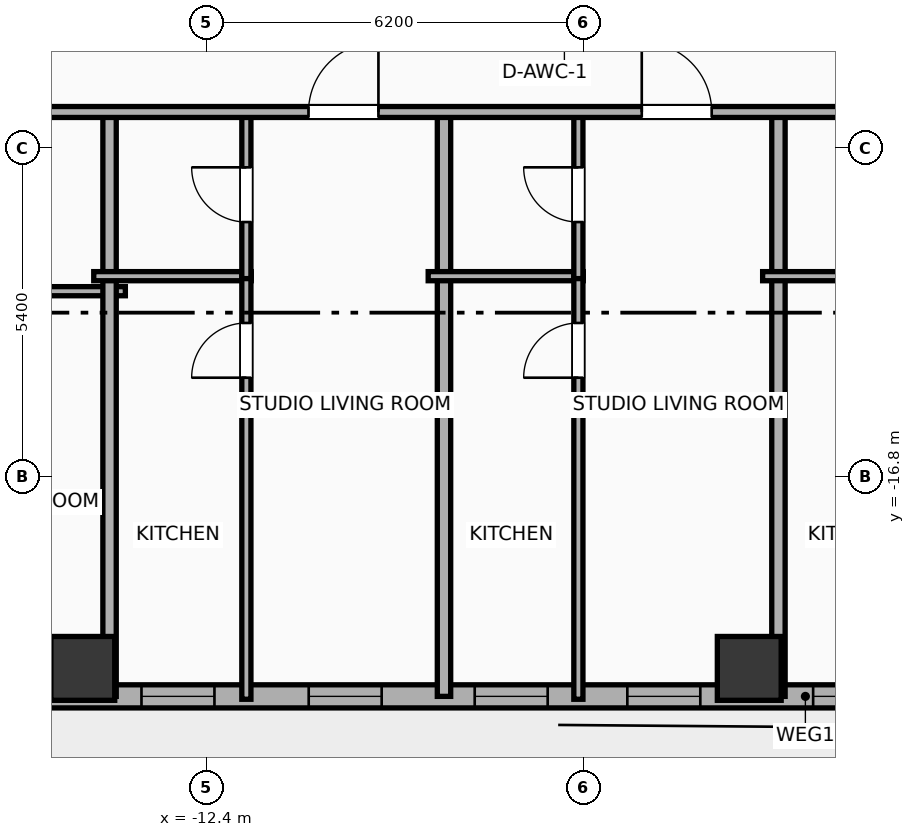
"""IFC4 building model, lengths in metres.
Left out: names, types, materials, properties, quantities, classifications, styles, units other than length and angle.
Written with IfcOpenShell. Run it as: python <this file> out.ifc"""

import sys

from ifc_helpers import new_model, si_unit, direction, frame, frame_2d, origin, origin_2d, place, context, subcontext, project, spatial, rectangle, hollow_rectangle, extrude, element, fill, save


model = new_model("IFC4")
c1 = context("Model", 3, precision=1e-05, world=origin(), true_north=direction((0.0, 1.0)))
c2 = subcontext(c1, "Body", "Model", "MODEL_VIEW")
j1 = project(units=[si_unit("LENGTHUNIT", "METRE"), si_unit("PLANEANGLEUNIT", "RADIAN")], contexts=[c1])
p1 = place(None, origin())
s1 = spatial("IfcSite", under=j1, at=p1, CompositionType="ELEMENT")
p2 = place(p1, origin())
s2 = spatial("IfcBuilding", under=s1, at=p2, CompositionType="ELEMENT")
p3 = place(p2, frame((0.0, 0.0, 85.8)))
s3 = spatial("IfcBuildingStorey", under=s2, at=p3, CompositionType="ELEMENT", Elevation=85.8)
for number, where, z_axis, x_axis in (
    (1, (-14.44, -19.95, -0.4), (0.0, 0.0, 1.0), (1.0, 0.0, 0.0)),
    (2, (-3.48, -19.95, -0.4), (0.0, 0.0, 1.0), (1.0, 0.0, 0.0)),
):
    element("IfcColumn", number, at=place(p3, frame(where, z_axis=z_axis, x_axis=x_axis)), inside=s3, PredefinedType="COLUMN", context=c2, shape_type="SweptSolid", body=[
        extrude(hollow_rectangle(XDim=1.05, YDim=1.05, WallThickness=0.036, at=origin_2d()), origin(), (0.0, 0.0, 1.0), 4.3),
    ])
p4 = place(p3, frame((29.381, -20.41, 0.0), z_axis=(0.0, 0.0, 1.0), x_axis=(-1.0, 0.0, 0.0)))
e3 = element("IfcWall", 3, at=p4, inside=s3, PredefinedType="ELEMENTEDWALL", context=c2, shape_type="SweptSolid", body=[
    extrude(rectangle(XDim=54.763, YDim=0.38, at=frame_2d((27.381, 0.0))), origin(), (0.0, 0.0, 1.0), 2.54),
])
p5 = place(p4, frame((18.486, 0.0, 0.75)))
e4 = element("IfcOpeningElement", 4, at=p5, cuts=e3, PredefinedType="OPENING", context=c2, shape_type="SweptSolid", body=[
    extrude(rectangle(XDim=2.4, YDim=1.45, at=frame_2d((1.2, 0.725))), frame((0.0, 0.2, 0.0), z_axis=(0.0, -1.0, 0.0), x_axis=(1.0, 0.0, 0.0)), (0.0, 0.0, 1.0), 0.4),
])
p6 = place(p4, frame((47.567, 0.0, 0.75)))
e5 = element("IfcOpeningElement", 5, at=p6, cuts=e3, PredefinedType="OPENING", context=c2, shape_type="SweptSolid", body=[
    extrude(rectangle(XDim=2.4, YDim=1.45, at=frame_2d((1.2, 0.725))), frame((0.0, 0.2, 0.0), z_axis=(0.0, -1.0, 0.0), x_axis=(1.0, 0.0, 0.0)), (0.0, 0.0, 1.0), 0.4),
])
p7 = place(p4, frame((7.464, 0.0, 0.0)))
e6 = element("IfcOpeningElement", 6, at=p7, cuts=e3, PredefinedType="OPENING", context=c2, shape_type="SweptSolid", body=[
    extrude(rectangle(XDim=1.5, YDim=2.05, at=frame_2d((0.75, 1.025))), frame((0.0, 0.2, 0.0), z_axis=(0.0, -1.0, 0.0), x_axis=(1.0, 0.0, 0.0)), (0.0, 0.0, 1.0), 0.4),
])
p8 = place(p4, frame((51.831, 0.0, 0.55)))
e7 = element("IfcOpeningElement", 7, at=p8, cuts=e3, PredefinedType="OPENING", context=c2, shape_type="SweptSolid", body=[
    extrude(rectangle(XDim=1.2, YDim=1.15, at=frame_2d((0.6, 0.575))), frame((0.0, 0.2, 0.0), z_axis=(0.0, -1.0, 0.0), x_axis=(1.0, 0.0, 0.0)), (0.0, 0.0, 1.0), 0.4),
])
p9 = place(p4, frame((44.606, 0.0, 0.55)))
e8 = element("IfcOpeningElement", 8, at=p9, cuts=e3, PredefinedType="OPENING", context=c2, shape_type="SweptSolid", body=[
    extrude(rectangle(XDim=1.2, YDim=1.15, at=frame_2d((0.6, 0.575))), frame((0.0, 0.2, 0.0), z_axis=(0.0, -1.0, 0.0), x_axis=(1.0, 0.0, 0.0)), (0.0, 0.0, 1.0), 0.4),
])
p10 = place(p4, frame((38.906, 0.0, 0.55)))
e9 = element("IfcOpeningElement", 9, at=p10, cuts=e3, PredefinedType="OPENING", context=c2, shape_type="SweptSolid", body=[
    extrude(rectangle(XDim=1.2, YDim=1.15, at=frame_2d((0.6, 0.575))), frame((0.0, 0.2, 0.0), z_axis=(0.0, -1.0, 0.0), x_axis=(1.0, 0.0, 0.0)), (0.0, 0.0, 1.0), 0.4),
])
p11 = place(p4, frame((41.656, 0.0, 0.55)))
e10 = element("IfcOpeningElement", 10, at=p11, cuts=e3, PredefinedType="OPENING", context=c2, shape_type="SweptSolid", body=[
    extrude(rectangle(XDim=1.2, YDim=1.15, at=frame_2d((0.6, 0.575))), frame((0.0, 0.2, 0.0), z_axis=(0.0, -1.0, 0.0), x_axis=(1.0, 0.0, 0.0)), (0.0, 0.0, 1.0), 0.4),
])
p12 = place(p4, frame((33.666, 0.0, 0.55)))
e11 = element("IfcOpeningElement", 11, at=p12, cuts=e3, PredefinedType="OPENING", context=c2, shape_type="SweptSolid", body=[
    extrude(rectangle(XDim=1.2, YDim=1.15, at=frame_2d((0.6, 0.575))), frame((0.0, 0.2, 0.0), z_axis=(0.0, -1.0, 0.0), x_axis=(1.0, 0.0, 0.0)), (0.0, 0.0, 1.0), 0.4),
])
p13 = place(p4, frame((36.176, 0.0, 0.55)))
e12 = element("IfcOpeningElement", 12, at=p13, cuts=e3, PredefinedType="OPENING", context=c2, shape_type="SweptSolid", body=[
    extrude(rectangle(XDim=1.2, YDim=1.15, at=frame_2d((0.6, 0.575))), frame((0.0, 0.2, 0.0), z_axis=(0.0, -1.0, 0.0), x_axis=(1.0, 0.0, 0.0)), (0.0, 0.0, 1.0), 0.4),
])
p14 = place(p4, frame((27.861, 0.0, 0.55)))
e13 = element("IfcOpeningElement", 13, at=p14, cuts=e3, PredefinedType="OPENING", context=c2, shape_type="SweptSolid", body=[
    extrude(rectangle(XDim=1.2, YDim=1.15, at=frame_2d((0.6, 0.575))), frame((0.0, 0.2, 0.0), z_axis=(0.0, -1.0, 0.0), x_axis=(1.0, 0.0, 0.0)), (0.0, 0.0, 1.0), 0.4),
])
p15 = place(p4, frame((30.611, 0.0, 0.55)))
e14 = element("IfcOpeningElement", 14, at=p15, cuts=e3, PredefinedType="OPENING", context=c2, shape_type="SweptSolid", body=[
    extrude(rectangle(XDim=1.2, YDim=1.15, at=frame_2d((0.6, 0.575))), frame((0.0, 0.2, 0.0), z_axis=(0.0, -1.0, 0.0), x_axis=(1.0, 0.0, 0.0)), (0.0, 0.0, 1.0), 0.4),
])
p16 = place(p4, frame((23.531, 0.0, 0.55)))
e15 = element("IfcOpeningElement", 15, at=p16, cuts=e3, PredefinedType="OPENING", context=c2, shape_type="SweptSolid", body=[
    extrude(rectangle(XDim=1.2, YDim=1.15, at=frame_2d((0.6, 0.575))), frame((0.0, 0.2, 0.0), z_axis=(0.0, -1.0, 0.0), x_axis=(1.0, 0.0, 0.0)), (0.0, 0.0, 1.0), 0.4),
])
p17 = place(p4, frame((16.386, 0.0, 0.55)))
e16 = element("IfcOpeningElement", 16, at=p17, cuts=e3, PredefinedType="OPENING", context=c2, shape_type="SweptSolid", body=[
    extrude(rectangle(XDim=1.2, YDim=1.15, at=frame_2d((0.6, 0.575))), frame((0.0, 0.2, 0.0), z_axis=(0.0, -1.0, 0.0), x_axis=(1.0, 0.0, 0.0)), (0.0, 0.0, 1.0), 0.4),
])
p18 = place(p4, frame((12.531, 0.0, 0.55)))
e17 = element("IfcOpeningElement", 17, at=p18, cuts=e3, PredefinedType="OPENING", context=c2, shape_type="SweptSolid", body=[
    extrude(rectangle(XDim=1.2, YDim=1.15, at=frame_2d((0.6, 0.575))), frame((0.0, 0.2, 0.0), z_axis=(0.0, -1.0, 0.0), x_axis=(1.0, 0.0, 0.0)), (0.0, 0.0, 1.0), 0.4),
])
p19 = place(p4, frame((4.377, 0.0, 0.55)))
e18 = element("IfcOpeningElement", 18, at=p19, cuts=e3, PredefinedType="OPENING", context=c2, shape_type="SweptSolid", body=[
    extrude(rectangle(XDim=1.2, YDim=1.15, at=frame_2d((0.6, 0.575))), frame((0.0, 0.2, 0.0), z_axis=(0.0, -1.0, 0.0), x_axis=(1.0, 0.0, 0.0)), (0.0, 0.0, 1.0), 0.4),
])
p20 = place(p4, frame((1.481, 0.0, 0.55)))
e19 = element("IfcOpeningElement", 19, at=p20, cuts=e3, PredefinedType="OPENING", context=c2, shape_type="SweptSolid", body=[
    extrude(rectangle(XDim=1.2, YDim=1.15, at=frame_2d((0.6, 0.575))), frame((0.0, 0.2, 0.0), z_axis=(0.0, -1.0, 0.0), x_axis=(1.0, 0.0, 0.0)), (0.0, 0.0, 1.0), 0.4),
])
p21 = place(p3, frame((-17.53, -13.747, 0.0), z_axis=(0.0, 0.0, 1.0), x_axis=(1.0, 0.0, 0.0)))
e20 = element("IfcWall", 20, at=p21, inside=s3, PredefinedType="PLUMBINGWALL", context=c2, shape_type="SweptSolid", body=[
    extrude(rectangle(XDim=3.79, YDim=0.15, at=frame_2d((1.895, 0.0))), origin(), (0.0, 0.0, 1.0), 3.65),
])
p22 = place(p3, frame((-14.0, -20.41, 0.0), z_axis=(0.0, 0.0, 1.0), x_axis=(0.0, 1.0, 0.0)))
e21 = element("IfcWall", 21, at=p22, inside=s3, PredefinedType="PARTITIONING", context=c2, shape_type="SweptSolid", body=[
    extrude(rectangle(XDim=9.69, YDim=0.22, at=frame_2d((4.845, 0.0))), origin(), (0.0, 0.0, 1.0), 2.54),
])
p23 = place(p3, frame((-14.26, -13.5, 0.0), z_axis=(0.0, 0.0, 1.0), x_axis=(1.0, 0.0, 0.0)))
e22 = element("IfcWall", 22, at=p23, inside=s3, PredefinedType="PLUMBINGWALL", context=c2, shape_type="SweptSolid", body=[
    extrude(rectangle(XDim=2.59, YDim=0.15, at=frame_2d((1.295, 0.0))), origin(), (0.0, 0.0, 1.0), 3.65),
])
p24 = place(p3, frame((-11.75, -20.458, 0.0), z_axis=(0.0, 0.0, 1.0), x_axis=(0.0, 1.0, 0.0)))
e23 = element("IfcWall", 23, at=p24, inside=s3, PredefinedType="PLUMBINGWALL", context=c2, shape_type="SweptSolid", body=[
    extrude(rectangle(XDim=6.998, YDim=0.15, at=frame_2d((3.499, 0.0))), origin(), (0.0, 0.0, 1.0), 3.65),
])
p25 = place(p24, frame((5.288, 0.0, 0.0)))
e24 = element("IfcOpeningElement", 24, at=p25, cuts=e23, PredefinedType="OPENING", context=c2, shape_type="SweptSolid", body=[
    extrude(rectangle(XDim=0.9, YDim=2.05, at=frame_2d((0.45, 1.025))), frame((0.0, 0.085, 0.0), z_axis=(0.0, -1.0, 0.0), x_axis=(1.0, 0.0, 0.0)), (0.0, 0.0, 1.0), 0.17),
])
p26 = place(p3, frame((-11.75, -13.54, 0.0), z_axis=(0.0, 0.0, 1.0), x_axis=(0.0, 1.0, 0.0)))
e25 = element("IfcWall", 25, at=p26, inside=s3, PredefinedType="PLUMBINGWALL", context=c2, shape_type="SweptSolid", body=[
    extrude(rectangle(XDim=2.76, YDim=0.15, at=frame_2d((1.38, 0.0))), origin(), (0.0, 0.0, 1.0), 3.65),
])
p27 = place(p26, frame((0.93, 0.0, 0.0)))
e26 = element("IfcOpeningElement", 26, at=p27, cuts=e25, PredefinedType="OPENING", context=c2, shape_type="SweptSolid", body=[
    extrude(rectangle(XDim=0.9, YDim=2.05, at=frame_2d((0.45, 1.025))), frame((0.0, 0.085, 0.0), z_axis=(0.0, -1.0, 0.0), x_axis=(1.0, 0.0, 0.0)), (0.0, 0.0, 1.0), 0.17),
])
p28 = place(p3, frame((-8.5, -20.41, 0.0), z_axis=(0.0, 0.0, 1.0), x_axis=(0.0, 1.0, 0.0)))
e27 = element("IfcWall", 27, at=p28, inside=s3, PredefinedType="PARTITIONING", context=c2, shape_type="SweptSolid", body=[
    extrude(rectangle(XDim=9.69, YDim=0.22, at=frame_2d((4.845, 0.0))), origin(), (0.0, 0.0, 1.0), 3.65),
])
p29 = place(p3, frame((-8.76, -13.5, 0.0), z_axis=(0.0, 0.0, 1.0), x_axis=(1.0, 0.0, 0.0)))
e28 = element("IfcWall", 28, at=p29, inside=s3, PredefinedType="PLUMBINGWALL", context=c2, shape_type="SweptSolid", body=[
    extrude(rectangle(XDim=2.55, YDim=0.15, at=frame_2d((1.275, 0.0))), origin(), (0.0, 0.0, 1.0), 3.65),
])
p30 = place(p3, frame((-6.29, -20.458, 0.0), z_axis=(0.0, 0.0, 1.0), x_axis=(0.0, 1.0, 0.0)))
e29 = element("IfcWall", 29, at=p30, inside=s3, PredefinedType="PLUMBINGWALL", context=c2, shape_type="SweptSolid", body=[
    extrude(rectangle(XDim=6.998, YDim=0.15, at=frame_2d((3.499, 0.0))), origin(), (0.0, 0.0, 1.0), 3.65),
])
p31 = place(p30, frame((5.288, 0.0, 0.0)))
e30 = element("IfcOpeningElement", 30, at=p31, cuts=e29, PredefinedType="OPENING", context=c2, shape_type="SweptSolid", body=[
    extrude(rectangle(XDim=0.9, YDim=2.05, at=frame_2d((0.45, 1.025))), frame((0.0, 0.085, 0.0), z_axis=(0.0, -1.0, 0.0), x_axis=(1.0, 0.0, 0.0)), (0.0, 0.0, 1.0), 0.17),
])
p32 = place(p3, frame((-6.29, -13.54, 0.0), z_axis=(0.0, 0.0, 1.0), x_axis=(0.0, 1.0, 0.0)))
e31 = element("IfcWall", 31, at=p32, inside=s3, PredefinedType="PLUMBINGWALL", context=c2, shape_type="SweptSolid", body=[
    extrude(rectangle(XDim=2.76, YDim=0.15, at=frame_2d((1.38, 0.0))), origin(), (0.0, 0.0, 1.0), 3.65),
])
p33 = place(p32, frame((0.93, 0.0, 0.0)))
e32 = element("IfcOpeningElement", 32, at=p33, cuts=e31, PredefinedType="OPENING", context=c2, shape_type="SweptSolid", body=[
    extrude(rectangle(XDim=0.9, YDim=2.05, at=frame_2d((0.45, 1.025))), frame((0.0, 0.085, 0.0), z_axis=(0.0, -1.0, 0.0), x_axis=(1.0, 0.0, 0.0)), (0.0, 0.0, 1.0), 0.17),
])
p34 = place(p3, frame((-3.0, -20.41, 0.0), z_axis=(0.0, 0.0, 1.0), x_axis=(0.0, 1.0, 0.0)))
e33 = element("IfcWall", 33, at=p34, inside=s3, PredefinedType="PARTITIONING", context=c2, shape_type="SweptSolid", body=[
    extrude(rectangle(XDim=9.69, YDim=0.22, at=frame_2d((4.845, 0.0))), origin(), (0.0, 0.0, 1.0), 2.54),
])
p35 = place(p3, frame((-3.26, -13.5, 0.0), z_axis=(0.0, 0.0, 1.0), x_axis=(1.0, 0.0, 0.0)))
e34 = element("IfcWall", 34, at=p35, inside=s3, PredefinedType="PLUMBINGWALL", context=c2, shape_type="SweptSolid", body=[
    extrude(rectangle(XDim=2.681, YDim=0.15, at=frame_2d((1.34, 0.0))), origin(), (0.0, 0.0, 1.0), 3.65),
])
p36 = place(p3, frame((-29.21, -10.8, 0.0), z_axis=(0.0, 0.0, 1.0), x_axis=(1.0, 0.0, 0.0)))
e35 = element("IfcWall", 35, at=p36, inside=s3, PredefinedType="PARTITIONING", context=c2, shape_type="SweptSolid", body=[
    extrude(rectangle(XDim=62.42, YDim=0.18, at=frame_2d((31.21, 0.0))), origin(), (0.0, 0.0, 1.0), 3.65),
])
p37 = place(p36, frame((3.357, 0.0, 0.0)))
e36 = element("IfcOpeningElement", 36, at=p37, cuts=e35, PredefinedType="OPENING", context=c2, shape_type="SweptSolid", body=[
    extrude(rectangle(XDim=1.15, YDim=2.05, at=frame_2d((0.575, 1.025))), frame((0.0, 0.1, 0.0), z_axis=(0.0, -1.0, 0.0), x_axis=(1.0, 0.0, 0.0)), (0.0, 0.0, 1.0), 0.2),
])
p38 = place(p36, frame((10.998, 0.0, 0.0)))
e37 = element("IfcOpeningElement", 37, at=p38, cuts=e35, PredefinedType="OPENING", context=c2, shape_type="SweptSolid", body=[
    extrude(rectangle(XDim=1.15, YDim=2.05, at=frame_2d((0.575, 1.025))), frame((0.0, 0.1, 0.0), z_axis=(0.0, -1.0, 0.0), x_axis=(1.0, 0.0, 0.0)), (0.0, 0.0, 1.0), 0.2),
])
p39 = place(p36, frame((18.482, 0.0, 0.0)))
e38 = element("IfcOpeningElement", 38, at=p39, cuts=e35, PredefinedType="OPENING", context=c2, shape_type="SweptSolid", body=[
    extrude(rectangle(XDim=1.15, YDim=2.05, at=frame_2d((0.575, 1.025))), frame((0.0, 0.1, 0.0), z_axis=(0.0, -1.0, 0.0), x_axis=(1.0, 0.0, 0.0)), (0.0, 0.0, 1.0), 0.2),
])
p40 = place(p36, frame((23.962, 0.0, 0.0)))
e39 = element("IfcOpeningElement", 39, at=p40, cuts=e35, PredefinedType="OPENING", context=c2, shape_type="SweptSolid", body=[
    extrude(rectangle(XDim=1.15, YDim=2.05, at=frame_2d((0.575, 1.025))), frame((0.0, 0.1, 0.0), z_axis=(0.0, -1.0, 0.0), x_axis=(1.0, 0.0, 0.0)), (0.0, 0.0, 1.0), 0.2),
])
p41 = place(p36, frame((29.524, 0.0, 0.0)))
e40 = element("IfcOpeningElement", 40, at=p41, cuts=e35, PredefinedType="OPENING", context=c2, shape_type="SweptSolid", body=[
    extrude(rectangle(XDim=1.15, YDim=2.05, at=frame_2d((0.575, 1.025))), frame((0.0, 0.1, 0.0), z_axis=(0.0, -1.0, 0.0), x_axis=(1.0, 0.0, 0.0)), (0.0, 0.0, 1.0), 0.2),
])
p42 = place(p36, frame((34.218, 0.0, 0.0)))
e41 = element("IfcOpeningElement", 41, at=p42, cuts=e35, PredefinedType="OPENING", context=c2, shape_type="SweptSolid", body=[
    extrude(rectangle(XDim=0.9, YDim=2.05, at=frame_2d((0.45, 1.025))), frame((0.0, 0.1, 0.0), z_axis=(0.0, -1.0, 0.0), x_axis=(1.0, 0.0, 0.0)), (0.0, 0.0, 1.0), 0.2),
])
p43 = place(p36, frame((38.313, 0.0, 0.0)))
e42 = element("IfcOpeningElement", 42, at=p43, cuts=e35, PredefinedType="OPENING", context=c2, shape_type="SweptSolid", body=[
    extrude(rectangle(XDim=1.15, YDim=2.05, at=frame_2d((0.575, 1.025))), frame((0.0, 0.1, 0.0), z_axis=(0.0, -1.0, 0.0), x_axis=(1.0, 0.0, 0.0)), (0.0, 0.0, 1.0), 0.2),
])
p44 = place(p36, frame((45.223, 0.0, 0.0)))
e43 = element("IfcOpeningElement", 43, at=p44, cuts=e35, PredefinedType="OPENING", context=c2, shape_type="SweptSolid", body=[
    extrude(rectangle(XDim=0.9, YDim=2.05, at=frame_2d((0.45, 1.025))), frame((0.0, 0.1, 0.0), z_axis=(0.0, -1.0, 0.0), x_axis=(1.0, 0.0, 0.0)), (0.0, 0.0, 1.0), 0.2),
])
p45 = place(p36, frame((51.352, 0.0, 0.0)))
e44 = element("IfcOpeningElement", 44, at=p45, cuts=e35, PredefinedType="OPENING", context=c2, shape_type="SweptSolid", body=[
    extrude(rectangle(XDim=1.15, YDim=2.05, at=frame_2d((0.575, 1.025))), frame((0.0, 0.1, 0.0), z_axis=(0.0, -1.0, 0.0), x_axis=(1.0, 0.0, 0.0)), (0.0, 0.0, 1.0), 0.2),
])
p46 = place(p36, frame((58.493, 0.0, 0.0)))
e45 = element("IfcOpeningElement", 45, at=p46, cuts=e35, PredefinedType="OPENING", context=c2, shape_type="SweptSolid", body=[
    extrude(rectangle(XDim=1.15, YDim=2.05, at=frame_2d((0.575, 1.025))), frame((0.0, 0.1, 0.0), z_axis=(0.0, -1.0, 0.0), x_axis=(1.0, 0.0, 0.0)), (0.0, 0.0, 1.0), 0.2),
])
p47 = place(p10, origin())
e46 = element("IfcWindow", 46, at=p47, inside=s3, PartitioningType="SINGLE_PANEL", PredefinedType="WINDOW", context=c2, shape_type="SweptSolid", body=[
    extrude(rectangle(XDim=1.2, YDim=1.15, at=frame_2d((0.6, 0.575))), frame((0.0, 0.03, 0.0), z_axis=(0.0, -1.0, 0.0), x_axis=(1.0, 0.0, 0.0)), (0.0, 0.0, 1.0), 0.06),
])
fill(e9, e46)
p48 = place(p11, origin())
e47 = element("IfcWindow", 47, at=p48, inside=s3, PartitioningType="SINGLE_PANEL", PredefinedType="WINDOW", context=c2, shape_type="SweptSolid", body=[
    extrude(rectangle(XDim=1.2, YDim=1.15, at=frame_2d((0.6, 0.575))), frame((0.0, 0.03, 0.0), z_axis=(0.0, -1.0, 0.0), x_axis=(1.0, 0.0, 0.0)), (0.0, 0.0, 1.0), 0.06),
])
fill(e10, e47)
p49 = place(p12, origin())
e48 = element("IfcWindow", 48, at=p49, inside=s3, PartitioningType="SINGLE_PANEL", PredefinedType="WINDOW", context=c2, shape_type="SweptSolid", body=[
    extrude(rectangle(XDim=1.2, YDim=1.15, at=frame_2d((0.6, 0.575))), frame((0.0, 0.03, 0.0), z_axis=(0.0, -1.0, 0.0), x_axis=(1.0, 0.0, 0.0)), (0.0, 0.0, 1.0), 0.06),
])
fill(e11, e48)
p50 = place(p13, origin())
e49 = element("IfcWindow", 49, at=p50, inside=s3, PartitioningType="SINGLE_PANEL", PredefinedType="WINDOW", context=c2, shape_type="SweptSolid", body=[
    extrude(rectangle(XDim=1.2, YDim=1.15, at=frame_2d((0.6, 0.575))), frame((0.0, 0.03, 0.0), z_axis=(0.0, -1.0, 0.0), x_axis=(1.0, 0.0, 0.0)), (0.0, 0.0, 1.0), 0.06),
])
fill(e12, e49)
p51 = place(p15, origin())
e50 = element("IfcWindow", 50, at=p51, inside=s3, PartitioningType="SINGLE_PANEL", PredefinedType="WINDOW", context=c2, shape_type="SweptSolid", body=[
    extrude(rectangle(XDim=1.2, YDim=1.15, at=frame_2d((0.6, 0.575))), frame((0.0, 0.03, 0.0), z_axis=(0.0, -1.0, 0.0), x_axis=(1.0, 0.0, 0.0)), (0.0, 0.0, 1.0), 0.06),
])
fill(e14, e50)
p52 = place(p25, origin())
e51 = element("IfcDoor", 51, at=p52, inside=s3, OperationType="SINGLE_SWING_LEFT", PredefinedType="DOOR", context=c2, shape_type="SweptSolid", body=[
    extrude(rectangle(XDim=0.9, YDim=2.05, at=frame_2d((0.45, 1.025))), frame((0.0, 0.025, 0.0), z_axis=(0.0, -1.0, 0.0), x_axis=(1.0, 0.0, 0.0)), (0.0, 0.0, 1.0), 0.05),
])
fill(e24, e51)
p53 = place(p27, origin())
e52 = element("IfcDoor", 52, at=p53, inside=s3, OperationType="SINGLE_SWING_RIGHT", PredefinedType="DOOR", context=c2, shape_type="SweptSolid", body=[
    extrude(rectangle(XDim=0.9, YDim=2.05, at=frame_2d((0.45, 1.025))), frame((0.0, 0.025, 0.0), z_axis=(0.0, -1.0, 0.0), x_axis=(1.0, 0.0, 0.0)), (0.0, 0.0, 1.0), 0.05),
])
fill(e26, e52)
p54 = place(p31, origin())
e53 = element("IfcDoor", 53, at=p54, inside=s3, OperationType="SINGLE_SWING_LEFT", PredefinedType="DOOR", context=c2, shape_type="SweptSolid", body=[
    extrude(rectangle(XDim=0.9, YDim=2.05, at=frame_2d((0.45, 1.025))), frame((0.0, 0.025, 0.0), z_axis=(0.0, -1.0, 0.0), x_axis=(1.0, 0.0, 0.0)), (0.0, 0.0, 1.0), 0.05),
])
fill(e30, e53)
p55 = place(p33, origin())
e54 = element("IfcDoor", 54, at=p55, inside=s3, OperationType="SINGLE_SWING_RIGHT", PredefinedType="DOOR", context=c2, shape_type="SweptSolid", body=[
    extrude(rectangle(XDim=0.9, YDim=2.05, at=frame_2d((0.45, 1.025))), frame((0.0, 0.025, 0.0), z_axis=(0.0, -1.0, 0.0), x_axis=(1.0, 0.0, 0.0)), (0.0, 0.0, 1.0), 0.05),
])
fill(e32, e54)
p56 = place(p39, origin())
e55 = element("IfcDoor", 55, at=p56, inside=s3, OperationType="SINGLE_SWING_RIGHT", PredefinedType="DOOR", context=c2, shape_type="SweptSolid", body=[
    extrude(rectangle(XDim=1.15, YDim=2.05, at=frame_2d((0.575, 1.025))), frame((0.0, 0.025, 0.0), z_axis=(0.0, -1.0, 0.0), x_axis=(1.0, 0.0, 0.0)), (0.0, 0.0, 1.0), 0.05),
])
fill(e38, e55)
p57 = place(p40, origin())
e56 = element("IfcDoor", 56, at=p57, inside=s3, OperationType="SINGLE_SWING_LEFT", PredefinedType="DOOR", context=c2, shape_type="SweptSolid", body=[
    extrude(rectangle(XDim=1.15, YDim=2.05, at=frame_2d((0.575, 1.025))), frame((0.0, 0.025, 0.0), z_axis=(0.0, -1.0, 0.0), x_axis=(1.0, 0.0, 0.0)), (0.0, 0.0, 1.0), 0.05),
])
fill(e39, e56)
save(model, sys.argv[1])
